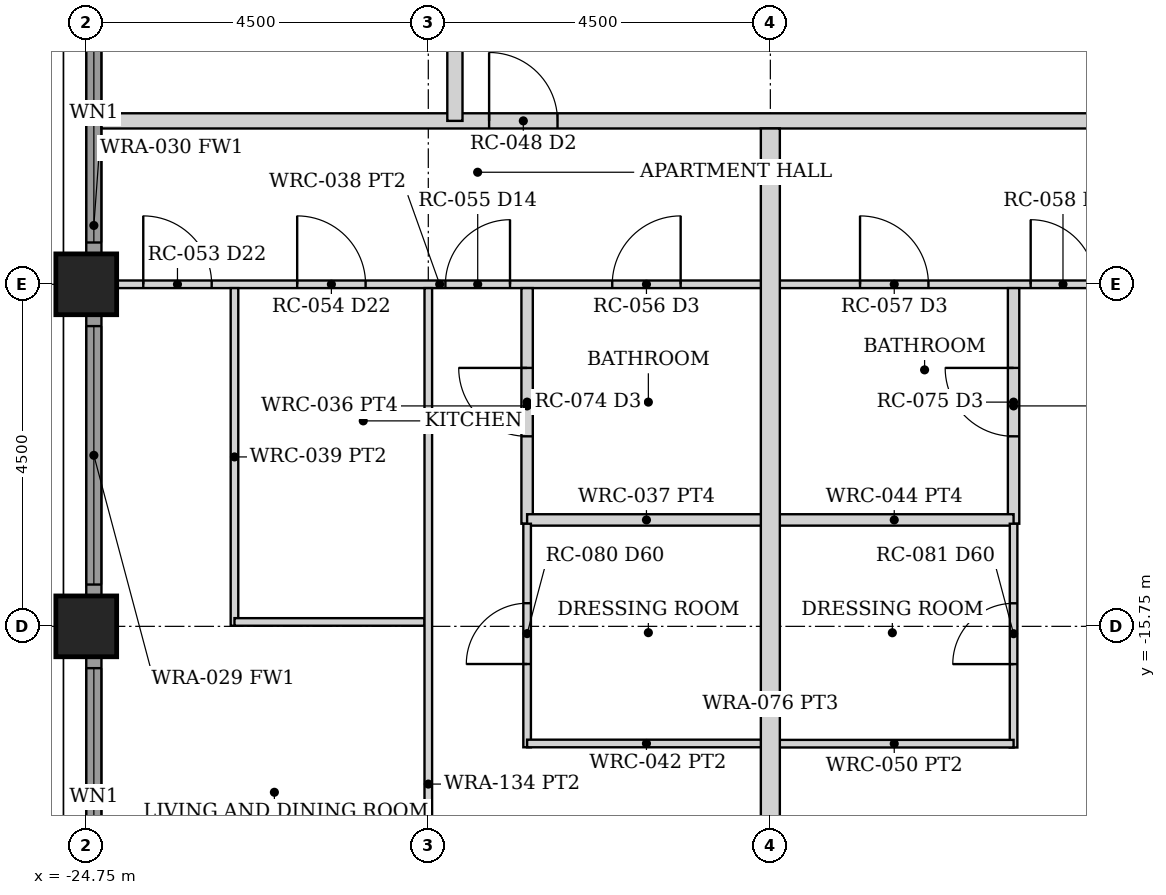
"""IFC4 building model, lengths in metres.
Left out: names, types, materials, properties, quantities, classifications, styles, units other than length and angle.
Written with IfcOpenShell. Run it as: python <this file> out.ifc"""

import sys

from ifc_helpers import new_model, si_unit, direction, frame, frame_2d, origin, origin_2d, place, context, subcontext, project, spatial, rectangle, hollow_rectangle, extrude, element, fill, save


model = new_model("IFC4")
c1 = context("Model", 3, precision=1e-05, world=origin(), true_north=direction((0.0, 1.0)))
c2 = subcontext(c1, "Body", "Model", "MODEL_VIEW")
j1 = project(units=[si_unit("LENGTHUNIT", "METRE"), si_unit("PLANEANGLEUNIT", "RADIAN")], contexts=[c1])
p1 = place(None, origin())
s1 = spatial("IfcSite", under=j1, at=p1, CompositionType="ELEMENT")
p2 = place(p1, origin())
s2 = spatial("IfcBuilding", under=s1, at=p2, CompositionType="ELEMENT")
p3 = place(p2, frame((0.0, 0.0, 47.5)))
s3 = spatial("IfcBuildingStorey", under=s2, at=p3, CompositionType="ELEMENT", Elevation=47.5)
for number, where, z_axis, x_axis in (
    (1, (-24.75, -15.75, 0.0), (0.0, 0.0, 1.0), (1.0, 0.0, 0.0)),
    (2, (-24.75, -11.25, 0.0), (0.0, 0.0, 1.0), (1.0, 0.0, 0.0)),
):
    element("IfcColumn", number, at=place(p3, frame(where, z_axis=z_axis, x_axis=x_axis)), inside=s3, PredefinedType="COLUMN", context=c2, shape_type="SweptSolid", body=[
        extrude(hollow_rectangle(XDim=0.8, YDim=0.8, WallThickness=0.07, at=origin_2d()), origin(), (0.0, 0.0, 1.0), 3.5),
    ])
p4 = place(p3, frame((-24.65, -19.845, 0.0), z_axis=(0.0, 0.0, 1.0), x_axis=(0.0, 1.0, 0.0)))
e3 = element("IfcWall", 3, at=p4, inside=s3, PredefinedType="SOLIDWALL", context=c2, shape_type="SweptSolid", body=[
    extrude(rectangle(XDim=3.69, YDim=0.2, at=frame_2d((1.845, 0.0))), origin(), (0.0, 0.0, 1.0), 2.379),
])
p5 = place(p4, frame((0.145, 0.0, 0.3)))
e4 = element("IfcOpeningElement", 4, at=p5, cuts=e3, PredefinedType="OPENING", context=c2, shape_type="SweptSolid", body=[
    extrude(rectangle(XDim=3.4, YDim=1.929, at=frame_2d((1.7, 0.964))), frame((0.0, 0.11, 0.0), z_axis=(0.0, -1.0, 0.0), x_axis=(1.0, 0.0, 0.0)), (0.0, 0.0, 1.0), 0.22),
])
p6 = place(p3, frame((-24.65, -15.345, 0.0), z_axis=(0.0, 0.0, 1.0), x_axis=(0.0, 1.0, 0.0)))
e5 = element("IfcWall", 5, at=p6, inside=s3, PredefinedType="SOLIDWALL", context=c2, shape_type="SweptSolid", body=[
    extrude(rectangle(XDim=3.69, YDim=0.2, at=frame_2d((1.845, 0.0))), origin(), (0.0, 0.0, 1.0), 2.379),
])
p7 = place(p6, frame((0.145, 0.0, 0.3)))
e6 = element("IfcOpeningElement", 6, at=p7, cuts=e5, PredefinedType="OPENING", context=c2, shape_type="SweptSolid", body=[
    extrude(rectangle(XDim=3.4, YDim=1.929, at=frame_2d((1.7, 0.964))), frame((0.0, 0.11, 0.0), z_axis=(0.0, -1.0, 0.0), x_axis=(1.0, 0.0, 0.0)), (0.0, 0.0, 1.0), 0.22),
])
p8 = place(p3, frame((-24.65, -10.845, 0.0), z_axis=(0.0, 0.0, 1.0), x_axis=(0.0, 1.0, 0.0)))
e7 = element("IfcWall", 7, at=p8, inside=s3, PredefinedType="SOLIDWALL", context=c2, shape_type="SweptSolid", body=[
    extrude(rectangle(XDim=3.69, YDim=0.2, at=frame_2d((1.845, 0.0))), origin(), (0.0, 0.0, 1.0), 2.379),
])
p9 = place(p8, frame((0.145, 0.0, 0.3)))
e8 = element("IfcOpeningElement", 8, at=p9, cuts=e7, PredefinedType="OPENING", context=c2, shape_type="SweptSolid", body=[
    extrude(rectangle(XDim=3.4, YDim=1.929, at=frame_2d((1.7, 0.964))), frame((0.0, 0.11, 0.0), z_axis=(0.0, -1.0, 0.0), x_axis=(1.0, 0.0, 0.0)), (0.0, 0.0, 1.0), 0.22),
])
p10 = place(p3, frame((-24.55, -9.1, 0.0), z_axis=(0.0, 0.0, 1.0), x_axis=(1.0, 0.0, 0.0)))
e9 = element("IfcWall", 9, at=p10, inside=s3, PredefinedType="PARTITIONING", context=c2, shape_type="SweptSolid", body=[
    extrude(rectangle(XDim=49.1, YDim=0.2, at=frame_2d((24.55, 0.0))), origin(), (0.0, 0.0, 1.0), 2.373),
])
p11 = place(p10, frame((5.1, 0.0, 0.0)))
e10 = element("IfcOpeningElement", 10, at=p11, cuts=e9, PredefinedType="OPENING", context=c2, shape_type="SweptSolid", body=[
    extrude(rectangle(XDim=0.9, YDim=2.1, at=frame_2d((0.45, 1.05))), frame((0.0, 0.11, 0.0), z_axis=(0.0, -1.0, 0.0), x_axis=(1.0, 0.0, 0.0)), (0.0, 0.0, 1.0), 0.22),
])
p12 = place(p10, frame((13.6, 0.0, 0.0)))
e11 = element("IfcOpeningElement", 11, at=p12, cuts=e9, PredefinedType="OPENING", context=c2, shape_type="SweptSolid", body=[
    extrude(rectangle(XDim=0.9, YDim=2.1, at=frame_2d((0.45, 1.05))), frame((0.0, 0.11, 0.0), z_axis=(0.0, -1.0, 0.0), x_axis=(1.0, 0.0, 0.0)), (0.0, 0.0, 1.0), 0.22),
])
p13 = place(p10, frame((18.1, 0.0, 0.0)))
e12 = element("IfcOpeningElement", 12, at=p13, cuts=e9, PredefinedType="OPENING", context=c2, shape_type="SweptSolid", body=[
    extrude(rectangle(XDim=0.9, YDim=2.1, at=frame_2d((0.45, 1.05))), frame((0.0, 0.11, 0.0), z_axis=(0.0, -1.0, 0.0), x_axis=(1.0, 0.0, 0.0)), (0.0, 0.0, 1.0), 0.22),
])
p14 = place(p10, frame((31.6, 0.0, 0.0)))
e13 = element("IfcOpeningElement", 13, at=p14, cuts=e9, PredefinedType="OPENING", context=c2, shape_type="SweptSolid", body=[
    extrude(rectangle(XDim=0.9, YDim=2.1, at=frame_2d((0.45, 1.05))), frame((0.0, 0.11, 0.0), z_axis=(0.0, -1.0, 0.0), x_axis=(1.0, 0.0, 0.0)), (0.0, 0.0, 1.0), 0.22),
])
p15 = place(p10, frame((43.1, 0.0, 0.0)))
e14 = element("IfcOpeningElement", 14, at=p15, cuts=e9, PredefinedType="OPENING", context=c2, shape_type="SweptSolid", body=[
    extrude(rectangle(XDim=0.9, YDim=2.1, at=frame_2d((0.45, 1.05))), frame((0.0, 0.11, 0.0), z_axis=(0.0, -1.0, 0.0), x_axis=(1.0, 0.0, 0.0)), (0.0, 0.0, 1.0), 0.22),
])
p16 = place(p3, frame((-19.9, -9.1, 0.0), z_axis=(0.0, 0.0, 1.0), x_axis=(0.0, 1.0, 0.0)))
e15 = element("IfcWall", 15, at=p16, inside=s3, PredefinedType="PARTITIONING", context=c2, shape_type="SweptSolid", body=[
    extrude(rectangle(XDim=18.2, YDim=0.2, at=frame_2d((9.1, 0.0))), origin(), (0.0, 0.0, 1.0), 2.373),
])
p17 = place(p16, frame((6.4, 0.0, 0.0)))
e16 = element("IfcOpeningElement", 16, at=p17, cuts=e15, PredefinedType="OPENING", context=c2, shape_type="SweptSolid", body=[
    extrude(rectangle(XDim=0.9, YDim=2.1, at=frame_2d((0.45, 1.05))), frame((0.0, 0.11, 0.0), z_axis=(0.0, -1.0, 0.0), x_axis=(1.0, 0.0, 0.0)), (0.0, 0.0, 1.0), 0.22),
])
p18 = place(p3, frame((-24.35, -11.25, 0.0), z_axis=(0.0, 0.0, 1.0), x_axis=(1.0, 0.0, 0.0)))
e17 = element("IfcWall", 17, at=p18, inside=s3, PredefinedType="PARTITIONING", context=c2, shape_type="SweptSolid", body=[
    extrude(rectangle(XDim=8.5, YDim=0.1, at=frame_2d((4.25, 0.0))), origin(), (0.0, 0.0, 1.0), 2.373),
])
p19 = place(p18, frame((2.375, 0.0, 0.0)))
e18 = element("IfcOpeningElement", 18, at=p19, cuts=e17, PredefinedType="OPENING", context=c2, shape_type="SweptSolid", body=[
    extrude(rectangle(XDim=0.9, YDim=2.1, at=frame_2d((0.45, 1.05))), frame((0.0, 0.06, 0.0), z_axis=(0.0, -1.0, 0.0), x_axis=(1.0, 0.0, 0.0)), (0.0, 0.0, 1.0), 0.12),
])
p20 = place(p18, frame((0.35, 0.0, 0.0)))
e19 = element("IfcOpeningElement", 19, at=p20, cuts=e17, PredefinedType="OPENING", context=c2, shape_type="SweptSolid", body=[
    extrude(rectangle(XDim=0.9, YDim=2.1, at=frame_2d((0.45, 1.05))), frame((0.0, 0.06, 0.0), z_axis=(0.0, -1.0, 0.0), x_axis=(1.0, 0.0, 0.0)), (0.0, 0.0, 1.0), 0.12),
])
p21 = place(p18, frame((4.325, 0.0, 0.0)))
e20 = element("IfcOpeningElement", 20, at=p21, cuts=e17, PredefinedType="OPENING", context=c2, shape_type="SweptSolid", body=[
    extrude(rectangle(XDim=0.85, YDim=2.1, at=frame_2d((0.425, 1.05))), frame((0.0, 0.06, 0.0), z_axis=(0.0, -1.0, 0.0), x_axis=(1.0, 0.0, 0.0)), (0.0, 0.0, 1.0), 0.12),
])
p22 = place(p18, frame((6.52, 0.0, 0.0)))
e21 = element("IfcOpeningElement", 21, at=p22, cuts=e17, PredefinedType="OPENING", context=c2, shape_type="SweptSolid", body=[
    extrude(rectangle(XDim=0.9, YDim=2.1, at=frame_2d((0.45, 1.05))), frame((0.0, 0.06, 0.0), z_axis=(0.0, -1.0, 0.0), x_axis=(1.0, 0.0, 0.0)), (0.0, 0.0, 1.0), 0.12),
])
p23 = place(p3, frame((-22.8, -15.742, 0.0), z_axis=(0.0, 0.0, 1.0), x_axis=(0.0, 1.0, 0.0)))
e22 = element("IfcWall", 22, at=p23, inside=s3, PredefinedType="PARTITIONING", context=c2, shape_type="SweptSolid", body=[
    extrude(rectangle(XDim=4.442, YDim=0.1, at=frame_2d((2.221, 0.0))), origin(), (0.0, 0.0, 1.0), 2.373),
])
p24 = place(p3, frame((-22.8, -15.692, 0.0), z_axis=(0.0, 0.0, 1.0), x_axis=(1.0, 0.0, 0.0)))
e23 = element("IfcWall", 23, at=p24, inside=s3, PredefinedType="PARTITIONING", context=c2, shape_type="SweptSolid", body=[
    extrude(rectangle(XDim=2.5, YDim=0.1, at=frame_2d((1.25, 0.0))), origin(), (0.0, 0.0, 1.0), 2.373),
])
p25 = place(p3, frame((-20.25, -24.35, 0.0), z_axis=(0.0, 0.0, 1.0), x_axis=(0.0, 1.0, 0.0)))
e24 = element("IfcWall", 24, at=p25, inside=s3, PredefinedType="PARTITIONING", context=c2, shape_type="SweptSolid", body=[
    extrude(rectangle(XDim=13.05, YDim=0.1, at=frame_2d((6.525, 0.0))), origin(), (0.0, 0.0, 1.0), 2.373),
])
p26 = place(p3, frame((-18.95, -14.4, 0.0), z_axis=(0.0, 0.0, 1.0), x_axis=(0.0, 1.0, 0.0)))
e25 = element("IfcWall", 25, at=p26, inside=s3, PredefinedType="PARTITIONING", context=c2, shape_type="SweptSolid", body=[
    extrude(rectangle(XDim=3.1, YDim=0.15, at=frame_2d((1.55, 0.0))), origin(), (0.0, 0.0, 1.0), 2.373),
])
p27 = place(p26, frame((1.15, 0.0, 0.0)))
e26 = element("IfcOpeningElement", 26, at=p27, cuts=e25, PredefinedType="OPENING", context=c2, shape_type="SweptSolid", body=[
    extrude(rectangle(XDim=0.9, YDim=2.1, at=frame_2d((0.45, 1.05))), frame((0.0, 0.085, 0.0), z_axis=(0.0, -1.0, 0.0), x_axis=(1.0, 0.0, 0.0)), (0.0, 0.0, 1.0), 0.17),
])
p28 = place(p3, frame((-18.95, -14.35, 0.0), z_axis=(0.0, 0.0, 1.0), x_axis=(1.0, 0.0, 0.0)))
e27 = element("IfcWall", 27, at=p28, inside=s3, PredefinedType="PARTITIONING", context=c2, shape_type="SweptSolid", body=[
    extrude(rectangle(XDim=3.14, YDim=0.15, at=frame_2d((1.57, 0.0))), origin(), (0.0, 0.0, 1.0), 2.373),
])
p29 = place(p3, frame((-18.95, -17.341, 0.0), z_axis=(0.0, 0.0, 1.0), x_axis=(0.0, 1.0, 0.0)))
e28 = element("IfcWall", 28, at=p29, inside=s3, PredefinedType="PARTITIONING", context=c2, shape_type="SweptSolid", body=[
    extrude(rectangle(XDim=2.941, YDim=0.1, at=frame_2d((1.47, 0.0))), origin(), (0.0, 0.0, 1.0), 2.373),
])
p30 = place(p29, frame((1.095, 0.0, 0.0)))
e29 = element("IfcOpeningElement", 29, at=p30, cuts=e28, PredefinedType="OPENING", context=c2, shape_type="SweptSolid", body=[
    extrude(rectangle(XDim=0.8, YDim=2.1, at=frame_2d((0.4, 1.05))), frame((0.0, 0.06, 0.0), z_axis=(0.0, -1.0, 0.0), x_axis=(1.0, 0.0, 0.0)), (0.0, 0.0, 1.0), 0.12),
])
p31 = place(p3, frame((-18.95, -17.291, 0.0), z_axis=(0.0, 0.0, 1.0), x_axis=(1.0, 0.0, 0.0)))
e30 = element("IfcWall", 30, at=p31, inside=s3, PredefinedType="PARTITIONING", context=c2, shape_type="SweptSolid", body=[
    extrude(rectangle(XDim=3.14, YDim=0.1, at=frame_2d((1.57, 0.0))), origin(), (0.0, 0.0, 1.0), 2.373),
])
p32 = place(p3, frame((-15.65, -11.25, 0.0), z_axis=(0.0, 0.0, 1.0), x_axis=(1.0, 0.0, 0.0)))
e31 = element("IfcWall", 31, at=p32, inside=s3, PredefinedType="PARTITIONING", context=c2, shape_type="SweptSolid", body=[
    extrude(rectangle(XDim=8.8, YDim=0.1, at=frame_2d((4.4, 0.0))), origin(), (0.0, 0.0, 1.0), 2.373),
])
p33 = place(p32, frame((5.35, 0.0, 0.0)))
e32 = element("IfcOpeningElement", 32, at=p33, cuts=e31, PredefinedType="OPENING", context=c2, shape_type="SweptSolid", body=[
    extrude(rectangle(XDim=0.9, YDim=2.1, at=frame_2d((0.45, 1.05))), frame((0.0, 0.06, 0.0), z_axis=(0.0, -1.0, 0.0), x_axis=(1.0, 0.0, 0.0)), (0.0, 0.0, 1.0), 0.12),
])
p34 = place(p32, frame((7.6, 0.0, 0.0)))
e33 = element("IfcOpeningElement", 33, at=p34, cuts=e31, PredefinedType="OPENING", context=c2, shape_type="SweptSolid", body=[
    extrude(rectangle(XDim=0.9, YDim=2.1, at=frame_2d((0.45, 1.05))), frame((0.0, 0.06, 0.0), z_axis=(0.0, -1.0, 0.0), x_axis=(1.0, 0.0, 0.0)), (0.0, 0.0, 1.0), 0.12),
])
p35 = place(p32, frame((3.325, 0.0, 0.0)))
e34 = element("IfcOpeningElement", 34, at=p35, cuts=e31, PredefinedType="OPENING", context=c2, shape_type="SweptSolid", body=[
    extrude(rectangle(XDim=0.85, YDim=2.1, at=frame_2d((0.425, 1.05))), frame((0.0, 0.06, 0.0), z_axis=(0.0, -1.0, 0.0), x_axis=(1.0, 0.0, 0.0)), (0.0, 0.0, 1.0), 0.12),
])
p36 = place(p32, frame((1.08, 0.0, 0.0)))
e35 = element("IfcOpeningElement", 35, at=p36, cuts=e31, PredefinedType="OPENING", context=c2, shape_type="SweptSolid", body=[
    extrude(rectangle(XDim=0.9, YDim=2.1, at=frame_2d((0.45, 1.05))), frame((0.0, 0.06, 0.0), z_axis=(0.0, -1.0, 0.0), x_axis=(1.0, 0.0, 0.0)), (0.0, 0.0, 1.0), 0.12),
])
p37 = place(p3, frame((-12.55, -14.4, 0.0), z_axis=(0.0, 0.0, 1.0), x_axis=(0.0, 1.0, 0.0)))
e36 = element("IfcWall", 36, at=p37, inside=s3, PredefinedType="PARTITIONING", context=c2, shape_type="SweptSolid", body=[
    extrude(rectangle(XDim=3.1, YDim=0.15, at=frame_2d((1.55, 0.0))), origin(), (0.0, 0.0, 1.0), 2.373),
])
p38 = place(p37, frame((1.15, 0.0, 0.0)))
e37 = element("IfcOpeningElement", 37, at=p38, cuts=e36, PredefinedType="OPENING", context=c2, shape_type="SweptSolid", body=[
    extrude(rectangle(XDim=0.9, YDim=2.1, at=frame_2d((0.45, 1.05))), frame((0.0, 0.085, 0.0), z_axis=(0.0, -1.0, 0.0), x_axis=(1.0, 0.0, 0.0)), (0.0, 0.0, 1.0), 0.17),
])
p39 = place(p3, frame((-15.69, -14.35, 0.0), z_axis=(0.0, 0.0, 1.0), x_axis=(1.0, 0.0, 0.0)))
e38 = element("IfcWall", 38, at=p39, inside=s3, PredefinedType="PARTITIONING", context=c2, shape_type="SweptSolid", body=[
    extrude(rectangle(XDim=3.14, YDim=0.15, at=frame_2d((1.57, 0.0))), origin(), (0.0, 0.0, 1.0), 2.373),
])
p40 = place(p3, frame((-12.55, -17.344, 0.0), z_axis=(0.0, 0.0, 1.0), x_axis=(0.0, 1.0, 0.0)))
e39 = element("IfcWall", 39, at=p40, inside=s3, PredefinedType="PARTITIONING", context=c2, shape_type="SweptSolid", body=[
    extrude(rectangle(XDim=2.944, YDim=0.1, at=frame_2d((1.472, 0.0))), origin(), (0.0, 0.0, 1.0), 2.373),
])
p41 = place(p40, frame((1.097, 0.0, 0.0)))
e40 = element("IfcOpeningElement", 40, at=p41, cuts=e39, PredefinedType="OPENING", context=c2, shape_type="SweptSolid", body=[
    extrude(rectangle(XDim=0.8, YDim=2.1, at=frame_2d((0.4, 1.05))), frame((0.0, 0.06, 0.0), z_axis=(0.0, -1.0, 0.0), x_axis=(1.0, 0.0, 0.0)), (0.0, 0.0, 1.0), 0.12),
])
p42 = place(p3, frame((-15.69, -17.293, 0.0), z_axis=(0.0, 0.0, 1.0), x_axis=(1.0, 0.0, 0.0)))
e41 = element("IfcWall", 41, at=p42, inside=s3, PredefinedType="PARTITIONING", context=c2, shape_type="SweptSolid", body=[
    extrude(rectangle(XDim=3.14, YDim=0.1, at=frame_2d((1.57, 0.0))), origin(), (0.0, 0.0, 1.0), 2.373),
])
p43 = place(p3, frame((-15.75, -24.35, 0.0), z_axis=(0.0, 0.0, 1.0), x_axis=(0.0, 1.0, 0.0)))
e42 = element("IfcWall", 42, at=p43, inside=s3, PredefinedType="PARTITIONING", context=c2, shape_type="SweptSolid", body=[
    extrude(rectangle(XDim=15.15, YDim=0.25, at=frame_2d((7.575, 0.0))), origin(), (0.0, 0.0, 1.0), 2.373),
])
p44 = place(p5, origin())
e43 = element("IfcWindow", 43, at=p44, inside=s3, PartitioningType="SINGLE_PANEL", PredefinedType="WINDOW", context=c2, shape_type="SweptSolid", body=[
    extrude(rectangle(XDim=3.4, YDim=1.929, at=frame_2d((1.7, 0.964))), frame((0.0, 0.03, 0.0), z_axis=(0.0, -1.0, 0.0), x_axis=(1.0, 0.0, 0.0)), (0.0, 0.0, 1.0), 0.06),
])
fill(e4, e43)
p45 = place(p7, origin())
e44 = element("IfcWindow", 44, at=p45, inside=s3, PartitioningType="SINGLE_PANEL", PredefinedType="WINDOW", context=c2, shape_type="SweptSolid", body=[
    extrude(rectangle(XDim=3.4, YDim=1.929, at=frame_2d((1.7, 0.964))), frame((0.0, 0.03, 0.0), z_axis=(0.0, -1.0, 0.0), x_axis=(1.0, 0.0, 0.0)), (0.0, 0.0, 1.0), 0.06),
])
fill(e6, e44)
p46 = place(p9, origin())
e45 = element("IfcWindow", 45, at=p46, inside=s3, PartitioningType="SINGLE_PANEL", PredefinedType="WINDOW", context=c2, shape_type="SweptSolid", body=[
    extrude(rectangle(XDim=3.4, YDim=1.929, at=frame_2d((1.7, 0.964))), frame((0.0, 0.03, 0.0), z_axis=(0.0, -1.0, 0.0), x_axis=(1.0, 0.0, 0.0)), (0.0, 0.0, 1.0), 0.06),
])
fill(e8, e45)
p47 = place(p11, origin())
e46 = element("IfcDoor", 46, at=p47, inside=s3, OperationType="SINGLE_SWING_LEFT", PredefinedType="DOOR", context=c2, shape_type="SweptSolid", body=[
    extrude(rectangle(XDim=0.9, YDim=2.1, at=frame_2d((0.45, 1.05))), frame((0.0, 0.025, 0.0), z_axis=(0.0, -1.0, 0.0), x_axis=(1.0, 0.0, 0.0)), (0.0, 0.0, 1.0), 0.05),
])
fill(e10, e46)
p48 = place(p19, origin())
e47 = element("IfcDoor", 47, at=p48, inside=s3, OperationType="SINGLE_SWING_LEFT", PredefinedType="DOOR", context=c2, shape_type="SweptSolid", body=[
    extrude(rectangle(XDim=0.9, YDim=2.1, at=frame_2d((0.45, 1.05))), frame((0.0, 0.025, 0.0), z_axis=(0.0, -1.0, 0.0), x_axis=(1.0, 0.0, 0.0)), (0.0, 0.0, 1.0), 0.05),
])
fill(e18, e47)
p49 = place(p20, origin())
e48 = element("IfcDoor", 48, at=p49, inside=s3, OperationType="SINGLE_SWING_LEFT", PredefinedType="DOOR", context=c2, shape_type="SweptSolid", body=[
    extrude(rectangle(XDim=0.9, YDim=2.1, at=frame_2d((0.45, 1.05))), frame((0.0, 0.025, 0.0), z_axis=(0.0, -1.0, 0.0), x_axis=(1.0, 0.0, 0.0)), (0.0, 0.0, 1.0), 0.05),
])
fill(e19, e48)
p50 = place(p21, origin())
e49 = element("IfcDoor", 49, at=p50, inside=s3, OperationType="SINGLE_SWING_RIGHT", PredefinedType="DOOR", context=c2, shape_type="SweptSolid", body=[
    extrude(rectangle(XDim=0.85, YDim=2.1, at=frame_2d((0.425, 1.05))), frame((0.0, 0.025, 0.0), z_axis=(0.0, -1.0, 0.0), x_axis=(1.0, 0.0, 0.0)), (0.0, 0.0, 1.0), 0.05),
])
fill(e20, e49)
p51 = place(p27, origin())
e50 = element("IfcDoor", 50, at=p51, inside=s3, OperationType="SINGLE_SWING_RIGHT", PredefinedType="DOOR", context=c2, shape_type="SweptSolid", body=[
    extrude(rectangle(XDim=0.9, YDim=2.1, at=frame_2d((0.45, 1.05))), frame((0.0, 0.025, 0.0), z_axis=(0.0, -1.0, 0.0), x_axis=(1.0, 0.0, 0.0)), (0.0, 0.0, 1.0), 0.05),
])
fill(e26, e50)
p52 = place(p22, origin())
e51 = element("IfcDoor", 51, at=p52, inside=s3, OperationType="SINGLE_SWING_RIGHT", PredefinedType="DOOR", context=c2, shape_type="SweptSolid", body=[
    extrude(rectangle(XDim=0.9, YDim=2.1, at=frame_2d((0.45, 1.05))), frame((0.0, 0.025, 0.0), z_axis=(0.0, -1.0, 0.0), x_axis=(1.0, 0.0, 0.0)), (0.0, 0.0, 1.0), 0.05),
])
fill(e21, e51)
p53 = place(p30, origin())
e52 = element("IfcDoor", 52, at=p53, inside=s3, OperationType="SINGLE_SWING_LEFT", PredefinedType="DOOR", context=c2, shape_type="SweptSolid", body=[
    extrude(rectangle(XDim=0.8, YDim=2.1, at=frame_2d((0.4, 1.05))), frame((0.0, 0.025, 0.0), z_axis=(0.0, -1.0, 0.0), x_axis=(1.0, 0.0, 0.0)), (0.0, 0.0, 1.0), 0.05),
])
fill(e29, e52)
p54 = place(p35, origin())
e53 = element("IfcDoor", 53, at=p54, inside=s3, OperationType="SINGLE_SWING_LEFT", PredefinedType="DOOR", context=c2, shape_type="SweptSolid", body=[
    extrude(rectangle(XDim=0.85, YDim=2.1, at=frame_2d((0.425, 1.05))), frame((0.0, 0.025, 0.0), z_axis=(0.0, -1.0, 0.0), x_axis=(1.0, 0.0, 0.0)), (0.0, 0.0, 1.0), 0.05),
])
fill(e34, e53)
p55 = place(p38, origin())
e54 = element("IfcDoor", 54, at=p55, inside=s3, OperationType="SINGLE_SWING_RIGHT", PredefinedType="DOOR", context=c2, shape_type="SweptSolid", body=[
    extrude(rectangle(XDim=0.9, YDim=2.1, at=frame_2d((0.45, 1.05))), frame((0.0, 0.025, 0.0), z_axis=(0.0, -1.0, 0.0), x_axis=(1.0, 0.0, 0.0)), (0.0, 0.0, 1.0), 0.05),
])
fill(e37, e54)
p56 = place(p36, origin())
e55 = element("IfcDoor", 55, at=p56, inside=s3, OperationType="SINGLE_SWING_LEFT", PredefinedType="DOOR", context=c2, shape_type="SweptSolid", body=[
    extrude(rectangle(XDim=0.9, YDim=2.1, at=frame_2d((0.45, 1.05))), frame((0.0, 0.025, 0.0), z_axis=(0.0, -1.0, 0.0), x_axis=(1.0, 0.0, 0.0)), (0.0, 0.0, 1.0), 0.05),
])
fill(e35, e55)
p57 = place(p41, origin())
e56 = element("IfcDoor", 56, at=p57, inside=s3, OperationType="SINGLE_SWING_LEFT", PredefinedType="DOOR", context=c2, shape_type="SweptSolid", body=[
    extrude(rectangle(XDim=0.8, YDim=2.1, at=frame_2d((0.4, 1.05))), frame((0.0, 0.025, 0.0), z_axis=(0.0, -1.0, 0.0), x_axis=(1.0, 0.0, 0.0)), (0.0, 0.0, 1.0), 0.05),
])
fill(e40, e56)
save(model, sys.argv[1])
